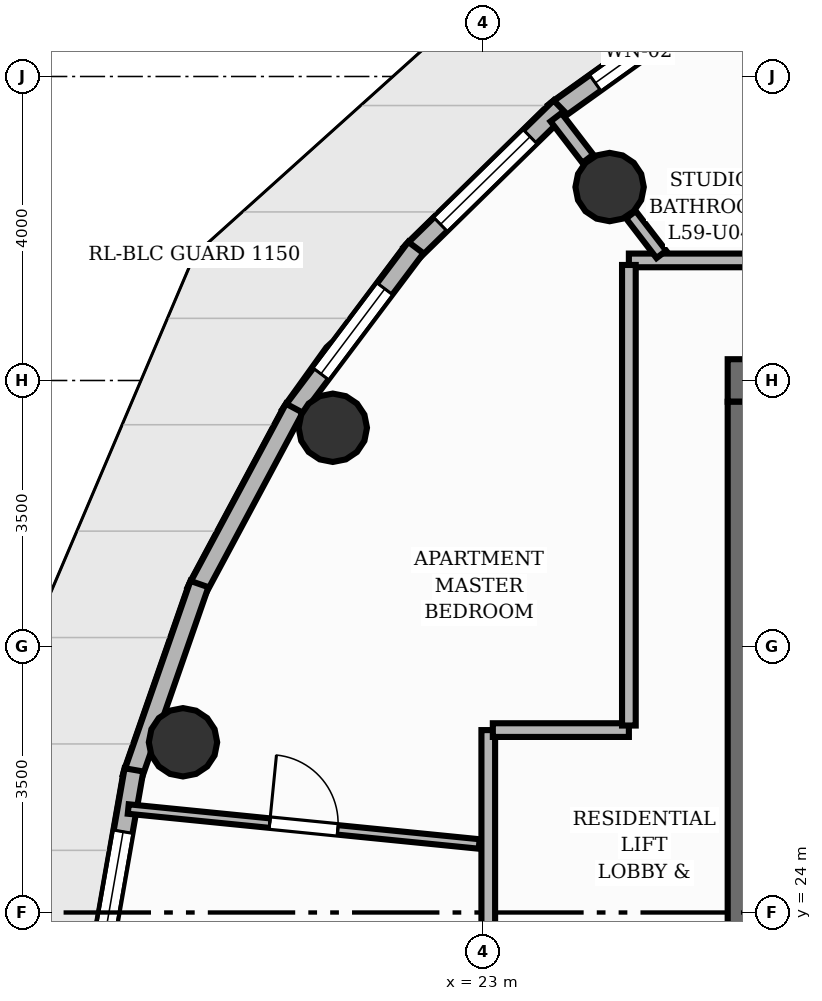
"""IFC4 building model, lengths in metres.
Left out: names, types, materials, properties, quantities, classifications, styles, units other than length and angle.
Written with IfcOpenShell. Run it as: python <this file> out.ifc"""

import sys

from ifc_helpers import new_model, si_unit, direction, frame, frame_2d, origin, origin_2d, place, context, subcontext, project, spatial, rectangle, circle, extrude, element, fill, save


model = new_model("IFC4")
c1 = context("Model", 3, precision=1e-05, world=origin(), true_north=direction((0.0, 1.0)))
c2 = subcontext(c1, "Body", "Model", "MODEL_VIEW")
j1 = project(units=[si_unit("LENGTHUNIT", "METRE"), si_unit("PLANEANGLEUNIT", "RADIAN")], contexts=[c1])
p1 = place(None, origin())
s1 = spatial("IfcSite", under=j1, at=p1, CompositionType="ELEMENT")
p2 = place(p1, origin())
s2 = spatial("IfcBuilding", under=s1, at=p2, CompositionType="ELEMENT")
p3 = place(p2, frame((0.0, 0.0, 198.24)))
s3 = spatial("IfcBuildingStorey", under=s2, at=p3, CompositionType="ELEMENT", Elevation=198.24)
p4 = place(p3, frame((26.22, 31.0, 0.0), z_axis=(0.0, 0.0, 1.0), x_axis=(1.0, 0.0, 0.0)))
e1 = element("IfcWall", 1, at=p4, inside=s3, PredefinedType="SHEAR", context=c2, shape_type="SweptSolid", body=[
    extrude(rectangle(XDim=11.56, YDim=0.56, at=frame_2d((5.78, 0.0))), origin(), (0.0, 0.0, 1.0), 3.2),
])
p5 = place(p4, frame((8.18, 0.0, 0.0)))
e2 = element("IfcOpeningElement", 2, at=p5, cuts=e1, PredefinedType="OPENING", context=c2, shape_type="SweptSolid", body=[
    extrude(rectangle(XDim=1.1, YDim=2.15, at=frame_2d((0.55, 1.075))), frame((0.0, 0.29, 0.0), z_axis=(0.0, -1.0, 0.0), x_axis=(1.0, 0.0, 0.0)), (0.0, 0.0, 1.0), 0.58),
])
p6 = place(p4, frame((0.805, 0.0, 0.0)))
e3 = element("IfcOpeningElement", 3, at=p6, cuts=e1, PredefinedType="OPENING", context=c2, shape_type="SweptSolid", body=[
    extrude(rectangle(XDim=1.05, YDim=2.15, at=frame_2d((0.525, 1.075))), frame((0.0, 0.29, 0.0), z_axis=(0.0, -1.0, 0.0), x_axis=(1.0, 0.0, 0.0)), (0.0, 0.0, 1.0), 0.58),
])
p7 = place(p4, frame((2.555, 0.0, 0.0)))
e4 = element("IfcOpeningElement", 4, at=p7, cuts=e1, PredefinedType="OPENING", context=c2, shape_type="SweptSolid", body=[
    extrude(rectangle(XDim=1.05, YDim=2.15, at=frame_2d((0.525, 1.075))), frame((0.0, 0.29, 0.0), z_axis=(0.0, -1.0, 0.0), x_axis=(1.0, 0.0, 0.0)), (0.0, 0.0, 1.0), 0.58),
])
p8 = place(p4, frame((4.305, 0.0, 0.0)))
e5 = element("IfcOpeningElement", 5, at=p8, cuts=e1, PredefinedType="OPENING", context=c2, shape_type="SweptSolid", body=[
    extrude(rectangle(XDim=1.05, YDim=2.15, at=frame_2d((0.525, 1.075))), frame((0.0, 0.29, 0.0), z_axis=(0.0, -1.0, 0.0), x_axis=(1.0, 0.0, 0.0)), (0.0, 0.0, 1.0), 0.58),
])
p9 = place(p3, frame((26.5, 17.28, 0.0), z_axis=(0.0, 0.0, 1.0), x_axis=(0.0, 1.0, 0.0)))
e6 = element("IfcWall", 6, at=p9, inside=s3, PredefinedType="SHEAR", context=c2, shape_type="SweptSolid", body=[
    extrude(rectangle(XDim=13.44, YDim=0.56, at=frame_2d((6.72, 0.0))), origin(), (0.0, 0.0, 1.0), 3.2),
])
for number, where, z_axis, x_axis in (
    (7, (24.667, 33.545, 0.0), (0.0, 0.0, 1.0), (1.0, 0.0, 0.0)),
    (8, (21.025, 30.378, 0.0), (0.0, 0.0, 1.0), (1.0, 0.0, 0.0)),
    (9, (19.054, 26.24, 0.0), (0.0, 0.0, 1.0), (1.0, 0.0, 0.0)),
):
    element("IfcColumn", number, at=place(p3, frame(where, z_axis=z_axis, x_axis=x_axis)), inside=s3, PredefinedType="COLUMN", context=c2, shape_type="SweptSolid", body=[
        extrude(circle(Radius=0.45, at=origin_2d()), origin(), (0.0, 0.0, 1.0), 3.2),
    ])
p10 = place(p3, frame((23.934, 34.526, 0.0), z_axis=(0.0, 0.0, 1.0), x_axis=(0.812997900305, 0.58226661771, 0.0)))
e10 = element("IfcWall", 10, at=p10, inside=s3, PredefinedType="SOLIDWALL", context=c2, shape_type="SweptSolid", body=[
    extrude(rectangle(XDim=2.739, YDim=0.25, at=frame_2d((1.369, 0.0))), origin(), (0.0, 0.0, 1.0), 2.96),
])
p11 = place(p10, frame((0.669, 0.0, 0.85)))
e11 = element("IfcOpeningElement", 11, at=p11, cuts=e10, PredefinedType="OPENING", context=c2, shape_type="SweptSolid", body=[
    extrude(rectangle(XDim=1.4, YDim=1.55, at=frame_2d((0.7, 0.775))), frame((0.0, 0.135, 0.0), z_axis=(0.0, -1.0, 0.0), x_axis=(1.0, 0.0, 0.0)), (0.0, 0.0, 1.0), 0.27),
])
p12 = place(p3, frame((22.045, 32.667, 0.0), z_axis=(0.0, 0.0, 1.0), x_axis=(0.71485422762, 0.699273503898, 0.0)))
e12 = element("IfcWall", 12, at=p12, inside=s3, PredefinedType="SOLIDWALL", context=c2, shape_type="SweptSolid", body=[
    extrude(rectangle(XDim=2.758, YDim=0.25, at=frame_2d((1.379, 0.0))), origin(), (0.0, 0.0, 1.0), 2.96),
])
p13 = place(p12, frame((0.554, 0.0, 0.85)))
e13 = element("IfcOpeningElement", 13, at=p13, cuts=e12, PredefinedType="OPENING", context=c2, shape_type="SweptSolid", body=[
    extrude(rectangle(XDim=1.65, YDim=1.55, at=frame_2d((0.825, 0.775))), frame((0.0, 0.135, 0.0), z_axis=(0.0, -1.0, 0.0), x_axis=(1.0, 0.0, 0.0)), (0.0, 0.0, 1.0), 0.27),
])
p14 = place(p3, frame((20.46, 30.544, 0.0), z_axis=(0.0, 0.0, 1.0), x_axis=(0.600877762795, 0.799340924874, 0.0)))
e14 = element("IfcWall", 14, at=p14, inside=s3, PredefinedType="SOLIDWALL", context=c2, shape_type="SweptSolid", body=[
    extrude(rectangle(XDim=2.758, YDim=0.25, at=frame_2d((1.379, 0.0))), origin(), (0.0, 0.0, 1.0), 2.96),
])
p15 = place(p14, frame((0.679, 0.0, 0.85)))
e15 = element("IfcOpeningElement", 15, at=p15, cuts=e14, PredefinedType="OPENING", context=c2, shape_type="SweptSolid", body=[
    extrude(rectangle(XDim=1.4, YDim=1.55, at=frame_2d((0.7, 0.775))), frame((0.0, 0.135, 0.0), z_axis=(0.0, -1.0, 0.0), x_axis=(1.0, 0.0, 0.0)), (0.0, 0.0, 1.0), 0.27),
])
p16 = place(p3, frame((19.226, 28.221, 0.0), z_axis=(0.0, 0.0, 1.0), x_axis=(0.472035862223, 0.88157934684, 0.0)))
e16 = element("IfcWall", 16, at=p16, inside=s3, PredefinedType="SOLIDWALL", context=c2, shape_type="SweptSolid", body=[
    extrude(rectangle(XDim=2.739, YDim=0.25, at=frame_2d((1.369, 0.0))), origin(), (0.0, 0.0, 1.0), 2.96),
])
p17 = place(p3, frame((18.381, 25.77, 0.0), z_axis=(0.0, 0.0, 1.0), x_axis=(0.329021781096, 0.94432233245, 0.0)))
e17 = element("IfcWall", 17, at=p17, inside=s3, PredefinedType="SOLIDWALL", context=c2, shape_type="SweptSolid", body=[
    extrude(rectangle(XDim=2.702, YDim=0.25, at=frame_2d((1.351, 0.0))), origin(), (0.0, 0.0, 1.0), 2.96),
])
p18 = place(p3, frame((17.95, 23.265, 0.0), z_axis=(0.0, 0.0, 1.0), x_axis=(0.172755592744, 0.984964722808, 0.0)))
e18 = element("IfcWall", 18, at=p18, inside=s3, PredefinedType="SOLIDWALL", context=c2, shape_type="SweptSolid", body=[
    extrude(rectangle(XDim=2.651, YDim=0.25, at=frame_2d((1.326, 0.0))), origin(), (0.0, 0.0, 1.0), 2.96),
])
p19 = place(p18, frame((0.175, 0.0, 0.85)))
e19 = element("IfcOpeningElement", 19, at=p19, cuts=e18, PredefinedType="OPENING", context=c2, shape_type="SweptSolid", body=[
    extrude(rectangle(XDim=1.65, YDim=1.55, at=frame_2d((0.825, 0.775))), frame((0.0, 0.135, 0.0), z_axis=(0.0, -1.0, 0.0), x_axis=(1.0, 0.0, 0.0)), (0.0, 0.0, 1.0), 0.27),
])
p20 = place(p3, frame((24.38, 33.918, 0.0), z_axis=(0.0, 0.0, 1.0), x_axis=(-0.60904199592, 0.793137974885, 0.0)))
e20 = element("IfcWall", 20, at=p20, inside=s3, PredefinedType="PARTITIONING", context=c2, shape_type="SweptSolid", body=[
    extrude(rectangle(XDim=0.688, YDim=0.18, at=frame_2d((0.344, 0.0))), origin(), (0.0, 0.0, 1.0), 2.403),
])
p21 = place(p3, frame((24.92, 32.58, 0.0), z_axis=(0.0, 0.0, 1.0), x_axis=(1.0, 0.0, 0.0)))
e21 = element("IfcWall", 21, at=p21, inside=s3, PredefinedType="PARTITIONING", context=c2, shape_type="SweptSolid", body=[
    extrude(rectangle(XDim=14.16, YDim=0.18, at=frame_2d((7.08, 0.0))), origin(), (0.0, 0.0, 1.0), 2.955),
])
p22 = place(p21, frame((11.563, 0.0, 0.0)))
e22 = element("IfcOpeningElement", 22, at=p22, cuts=e21, PredefinedType="OPENING", context=c2, shape_type="SweptSolid", body=[
    extrude(rectangle(XDim=1.05, YDim=2.15, at=frame_2d((0.525, 1.075))), frame((0.0, 0.1, 0.0), z_axis=(0.0, -1.0, 0.0), x_axis=(1.0, 0.0, 0.0)), (0.0, 0.0, 1.0), 0.2),
])
p23 = place(p21, frame((5.684, 0.0, 0.0)))
e23 = element("IfcOpeningElement", 23, at=p23, cuts=e21, PredefinedType="OPENING", context=c2, shape_type="SweptSolid", body=[
    extrude(rectangle(XDim=1.05, YDim=2.15, at=frame_2d((0.525, 1.075))), frame((0.0, 0.1, 0.0), z_axis=(0.0, -1.0, 0.0), x_axis=(1.0, 0.0, 0.0)), (0.0, 0.0, 1.0), 0.2),
])
p24 = place(p3, frame((23.07, 21.66, 0.0), z_axis=(0.0, 0.0, 1.0), x_axis=(0.0, 1.0, 0.0)))
e24 = element("IfcWall", 24, at=p24, inside=s3, PredefinedType="PARTITIONING", context=c2, shape_type="SweptSolid", body=[
    extrude(rectangle(XDim=4.74, YDim=0.18, at=frame_2d((2.37, 0.0))), origin(), (0.0, 0.0, 1.0), 2.955),
])
p25 = place(p24, frame((1.1, 0.0, 0.0)))
e25 = element("IfcOpeningElement", 25, at=p25, cuts=e24, PredefinedType="OPENING", context=c2, shape_type="SweptSolid", body=[
    extrude(rectangle(XDim=1.05, YDim=2.15, at=frame_2d((0.525, 1.075))), frame((0.0, 0.1, 0.0), z_axis=(0.0, -1.0, 0.0), x_axis=(1.0, 0.0, 0.0)), (0.0, 0.0, 1.0), 0.2),
])
p26 = place(p3, frame((23.13, 26.4, 0.0), z_axis=(0.0, 0.0, 1.0), x_axis=(1.0, 0.0, 0.0)))
e26 = element("IfcWall", 26, at=p26, inside=s3, PredefinedType="PARTITIONING", context=c2, shape_type="SweptSolid", body=[
    extrude(rectangle(XDim=1.79, YDim=0.18, at=frame_2d((0.895, 0.0))), origin(), (0.0, 0.0, 1.0), 2.692),
])
p27 = place(p3, frame((24.92, 26.46, 0.0), z_axis=(0.0, 0.0, 1.0), x_axis=(0.0, 1.0, 0.0)))
e27 = element("IfcWall", 27, at=p27, inside=s3, PredefinedType="PARTITIONING", context=c2, shape_type="SweptSolid", body=[
    extrude(rectangle(XDim=6.06, YDim=0.18, at=frame_2d((3.03, 0.0))), origin(), (0.0, 0.0, 1.0), 2.955),
])
p28 = place(p3, frame((25.347, 32.659, 0.0), z_axis=(0.0, 0.0, 1.0), x_axis=(-0.609101063055, 0.79309261438, 0.0)))
e28 = element("IfcWall", 28, at=p28, inside=s3, PredefinedType="PLUMBINGWALL", context=c2, shape_type="SweptSolid", body=[
    extrude(rectangle(XDim=0.658, YDim=0.16, at=frame_2d((0.329, 0.0))), origin(), (0.0, 0.0, 1.0), 2.403),
])
p29 = place(p3, frame((18.333, 25.362, 0.0), z_axis=(0.0, 0.0, 1.0), x_axis=(0.995074627982, -0.09912862728, 0.0)))
e29 = element("IfcWall", 29, at=p29, inside=s3, PredefinedType="PARTITIONING", context=c2, shape_type="SweptSolid", body=[
    extrude(rectangle(XDim=4.64, YDim=0.125, at=frame_2d((2.32, 0.0))), origin(), (0.0, 0.0, 1.0), 2.955),
])
p30 = place(p29, frame((1.87, 0.0, 0.0)))
e30 = element("IfcOpeningElement", 30, at=p30, cuts=e29, PredefinedType="OPENING", context=c2, shape_type="SweptSolid", body=[
    extrude(rectangle(XDim=0.9, YDim=2.1, at=frame_2d((0.45, 1.05))), frame((0.0, 0.073, 0.0), z_axis=(0.0, -1.0, 0.0), x_axis=(1.0, 0.0, 0.0)), (0.0, 0.0, 1.0), 0.145),
])
p31 = place(p11, origin())
e31 = element("IfcWindow", 31, at=p31, inside=s3, PartitioningType="SINGLE_PANEL", PredefinedType="WINDOW", context=c2, shape_type="SweptSolid", body=[
    extrude(rectangle(XDim=1.4, YDim=1.55, at=frame_2d((0.7, 0.775))), frame((0.0, 0.03, 0.0), z_axis=(0.0, -1.0, 0.0), x_axis=(1.0, 0.0, 0.0)), (0.0, 0.0, 1.0), 0.06),
])
fill(e11, e31)
p32 = place(p13, origin())
e32 = element("IfcWindow", 32, at=p32, inside=s3, PartitioningType="SINGLE_PANEL", PredefinedType="WINDOW", context=c2, shape_type="SweptSolid", body=[
    extrude(rectangle(XDim=1.65, YDim=1.55, at=frame_2d((0.825, 0.775))), frame((0.0, 0.03, 0.0), z_axis=(0.0, -1.0, 0.0), x_axis=(1.0, 0.0, 0.0)), (0.0, 0.0, 1.0), 0.06),
])
fill(e13, e32)
p33 = place(p15, origin())
e33 = element("IfcWindow", 33, at=p33, inside=s3, PartitioningType="SINGLE_PANEL", PredefinedType="WINDOW", context=c2, shape_type="SweptSolid", body=[
    extrude(rectangle(XDim=1.4, YDim=1.55, at=frame_2d((0.7, 0.775))), frame((0.0, 0.03, 0.0), z_axis=(0.0, -1.0, 0.0), x_axis=(1.0, 0.0, 0.0)), (0.0, 0.0, 1.0), 0.06),
])
fill(e15, e33)
p34 = place(p19, origin())
e34 = element("IfcWindow", 34, at=p34, inside=s3, PartitioningType="SINGLE_PANEL", PredefinedType="WINDOW", context=c2, shape_type="SweptSolid", body=[
    extrude(rectangle(XDim=1.65, YDim=1.55, at=frame_2d((0.825, 0.775))), frame((0.0, 0.03, 0.0), z_axis=(0.0, -1.0, 0.0), x_axis=(1.0, 0.0, 0.0)), (0.0, 0.0, 1.0), 0.06),
])
fill(e19, e34)
p35 = place(p30, origin())
e35 = element("IfcDoor", 35, at=p35, inside=s3, OperationType="SINGLE_SWING_LEFT", PredefinedType="DOOR", context=c2, shape_type="SweptSolid", body=[
    extrude(rectangle(XDim=0.9, YDim=2.1, at=frame_2d((0.45, 1.05))), frame((0.0, 0.025, 0.0), z_axis=(0.0, -1.0, 0.0), x_axis=(1.0, 0.0, 0.0)), (0.0, 0.0, 1.0), 0.05),
])
fill(e30, e35)
save(model, sys.argv[1])
